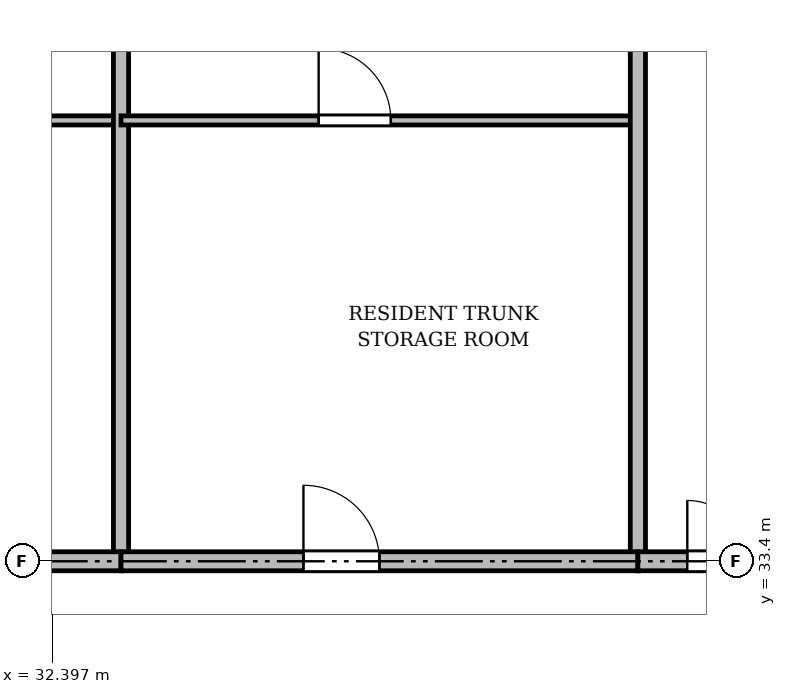
"""IFC4 building model, lengths in metres.
Left out: names, types, materials, properties, quantities, classifications, styles, units other than length and angle.
Written with IfcOpenShell. Run it as: python <this file> out.ifc"""

import sys

from ifc_helpers import new_model, si_unit, direction, frame, frame_2d, origin, place, context, subcontext, project, spatial, rectangle, extrude, source, transform, mapped, element, fill, save


model = new_model("IFC4")
c1 = context("Model", 3, precision=1e-05, world=origin(), true_north=direction((0.0, 1.0)))
c2 = subcontext(c1, "Body", "Model", "MODEL_VIEW")
j1 = project(units=[si_unit("LENGTHUNIT", "METRE"), si_unit("PLANEANGLEUNIT", "RADIAN")], contexts=[c1])
p1 = place(None, origin())
s1 = spatial("IfcSite", under=j1, at=p1, CompositionType="ELEMENT")
p2 = place(p1, origin())
s2 = spatial("IfcBuilding", under=s1, at=p2, CompositionType="ELEMENT")
p3 = place(p2, frame((0.0, 0.0, 281.1)))
s3 = spatial("IfcBuildingStorey", under=s2, at=p3, CompositionType="ELEMENT", Elevation=281.1)
p4 = place(p3, frame((26.3, 39.2, 0.0), z_axis=(0.0, 0.0, 1.0), x_axis=(1.0, 0.0, 0.0)))
e1 = element("IfcWall", 1, at=p4, inside=s3, PredefinedType="PARTITIONING", context=c2, shape_type="SweptSolid", body=[
    extrude(rectangle(XDim=7.0, YDim=0.12, at=frame_2d((3.5, 0.0))), origin(), (0.0, 0.0, 1.0), 2.87),
])
p5 = place(p4, frame((2.6, 0.0, 0.0)))
e2 = element("IfcOpeningElement", 2, at=p5, cuts=e1, PredefinedType="OPENING", context=c2, shape_type="SweptSolid", body=[
    extrude(rectangle(XDim=0.95, YDim=2.15, at=frame_2d((0.475, 1.075))), frame((0.0, 0.07, 0.0), z_axis=(0.0, -1.0, 0.0), x_axis=(1.0, 0.0, 0.0)), (0.0, 0.0, 1.0), 0.14),
])
p6 = place(p3, frame((33.3, 33.4, 0.0), z_axis=(0.0, 0.0, 1.0), x_axis=(0.0, 1.0, 0.0)))
e3 = element("IfcWall", 3, at=p6, inside=s3, PredefinedType="SOLIDWALL", context=c2, shape_type="SweptSolid", body=[
    extrude(rectangle(XDim=11.3, YDim=0.2, at=frame_2d((5.65, 0.0))), origin(), (0.0, 0.0, 1.0), 2.92),
])
p7 = place(p3, frame((33.3, 39.2, 0.0), z_axis=(0.0, 0.0, 1.0), x_axis=(1.0, 0.0, 0.0)))
e4 = element("IfcWall", 4, at=p7, inside=s3, PredefinedType="PARTITIONING", context=c2, shape_type="SweptSolid", body=[
    extrude(rectangle(XDim=6.8, YDim=0.12, at=frame_2d((3.4, 0.0))), origin(), (0.0, 0.0, 1.0), 3.37),
])
p8 = place(p7, frame((2.6, 0.0, 0.0)))
e5 = element("IfcOpeningElement", 5, at=p8, cuts=e4, PredefinedType="OPENING", context=c2, shape_type="SweptSolid", body=[
    extrude(rectangle(XDim=0.95, YDim=2.15, at=frame_2d((0.475, 1.075))), frame((0.0, 0.07, 0.0), z_axis=(0.0, -1.0, 0.0), x_axis=(1.0, 0.0, 0.0)), (0.0, 0.0, 1.0), 0.14),
])
p9 = place(p3, frame((40.1, 33.4, 0.0), z_axis=(0.0, 0.0, 1.0), x_axis=(0.0, 1.0, 0.0)))
e6 = element("IfcWall", 6, at=p9, inside=s3, PredefinedType="SOLIDWALL", context=c2, shape_type="SweptSolid", body=[
    extrude(rectangle(XDim=8.0, YDim=0.2, at=frame_2d((4.0, 0.0))), origin(), (0.0, 0.0, 1.0), 2.92),
])
p10 = place(p3, frame((26.3, 33.4, 0.0), z_axis=(0.0, 0.0, 1.0), x_axis=(1.0, 0.0, 0.0)))
e7 = element("IfcWall", 7, at=p10, inside=s3, PredefinedType="PARTITIONING", context=c2, shape_type="SweptSolid", body=[
    extrude(rectangle(XDim=7.0, YDim=0.25, at=frame_2d((3.5, 0.0))), origin(), (0.0, 0.0, 1.0), 2.92),
])
p11 = place(p10, frame((1.35, 0.0, 0.0)))
e8 = element("IfcOpeningElement", 8, at=p11, cuts=e7, PredefinedType="OPENING", context=c2, shape_type="SweptSolid", body=[
    extrude(rectangle(XDim=0.95, YDim=2.15, at=frame_2d((0.475, 1.075))), frame((0.0, 0.135, 0.0), z_axis=(0.0, -1.0, 0.0), x_axis=(1.0, 0.0, 0.0)), (0.0, 0.0, 1.0), 0.27),
])
p12 = place(p3, frame((33.3, 33.4, 0.0), z_axis=(0.0, 0.0, 1.0), x_axis=(1.0, 0.0, 0.0)))
e9 = element("IfcWall", 9, at=p12, inside=s3, PredefinedType="PARTITIONING", context=c2, shape_type="SweptSolid", body=[
    extrude(rectangle(XDim=6.8, YDim=0.25, at=frame_2d((3.4, 0.0))), origin(), (0.0, 0.0, 1.0), 2.92),
])
p13 = place(p12, frame((2.4, 0.0, 0.0)))
e10 = element("IfcOpeningElement", 10, at=p13, cuts=e9, PredefinedType="OPENING", context=c2, shape_type="SweptSolid", body=[
    extrude(rectangle(XDim=1.0, YDim=2.15, at=frame_2d((0.5, 1.075))), frame((0.0, 0.135, 0.0), z_axis=(0.0, -1.0, 0.0), x_axis=(1.0, 0.0, 0.0)), (0.0, 0.0, 1.0), 0.27),
])
p14 = place(p3, frame((40.1, 33.4, 0.0), z_axis=(0.0, 0.0, 1.0), x_axis=(1.0, 0.0, 0.0)))
e11 = element("IfcWall", 11, at=p14, inside=s3, PredefinedType="PARTITIONING", context=c2, shape_type="SweptSolid", body=[
    extrude(rectangle(XDim=7.05, YDim=0.25, at=frame_2d((3.525, 0.0))), origin(), (0.0, 0.0, 1.0), 2.92),
])
p15 = place(p14, frame((0.65, 0.0, 0.0)))
e12 = element("IfcOpeningElement", 12, at=p15, cuts=e11, PredefinedType="OPENING", context=c2, shape_type="SweptSolid", body=[
    extrude(rectangle(XDim=1.6, YDim=2.2, at=frame_2d((0.8, 1.1))), frame((0.0, 0.135, 0.0), z_axis=(0.0, -1.0, 0.0), x_axis=(1.0, 0.0, 0.0)), (0.0, 0.0, 1.0), 0.27),
])
m1 = source(origin(), c2, "Body", "SweptSolid", [
    extrude(rectangle(XDim=0.95, YDim=2.15, at=frame_2d((0.475, 1.075))), frame((0.0, 0.025, 0.0), z_axis=(0.0, -1.0, 0.0), x_axis=(1.0, 0.0, 0.0)), (0.0, 0.0, 1.0), 0.05),
])
p16 = place(p8, origin())
e13 = element("IfcDoor", 13, at=p16, inside=s3, OperationType="SINGLE_SWING_LEFT", PredefinedType="DOOR", context=c2, shape_type="MappedRepresentation", body=[
    mapped(m1, transform((0.0, 0.0, 0.0), x_axis=(1.0, 0.0, 0.0), y_axis=(0.0, 1.0, 0.0), z_axis=(0.0, 0.0, 1.0), scale=1.0)),
])
fill(e5, e13)
m2 = source(origin(), c2, "Body", "SweptSolid", [
    extrude(rectangle(XDim=1.0, YDim=2.15, at=frame_2d((0.5, 1.075))), frame((0.0, 0.025, 0.0), z_axis=(0.0, -1.0, 0.0), x_axis=(1.0, 0.0, 0.0)), (0.0, 0.0, 1.0), 0.05),
])
p17 = place(p13, origin())
e14 = element("IfcDoor", 14, at=p17, inside=s3, OperationType="SINGLE_SWING_LEFT", PredefinedType="DOOR", context=c2, shape_type="MappedRepresentation", body=[
    mapped(m2, transform((0.0, 0.0, 0.0), x_axis=(1.0, 0.0, 0.0), y_axis=(0.0, 1.0, 0.0), z_axis=(0.0, 0.0, 1.0), scale=1.0)),
])
fill(e10, e14)
m3 = source(origin(), c2, "Body", "SweptSolid", [
    extrude(rectangle(XDim=1.6, YDim=2.2, at=frame_2d((0.8, 1.1))), frame((0.0, 0.025, 0.0), z_axis=(0.0, -1.0, 0.0), x_axis=(1.0, 0.0, 0.0)), (0.0, 0.0, 1.0), 0.05),
])
p18 = place(p15, origin())
e15 = element("IfcDoor", 15, at=p18, inside=s3, OperationType="DOUBLE_DOOR_SINGLE_SWING", PredefinedType="DOOR", context=c2, shape_type="MappedRepresentation", body=[
    mapped(m3, transform((0.0, 0.0, 0.0), x_axis=(1.0, 0.0, 0.0), y_axis=(0.0, 1.0, 0.0), z_axis=(0.0, 0.0, 1.0), scale=1.0)),
])
fill(e12, e15)
save(model, sys.argv[1])
